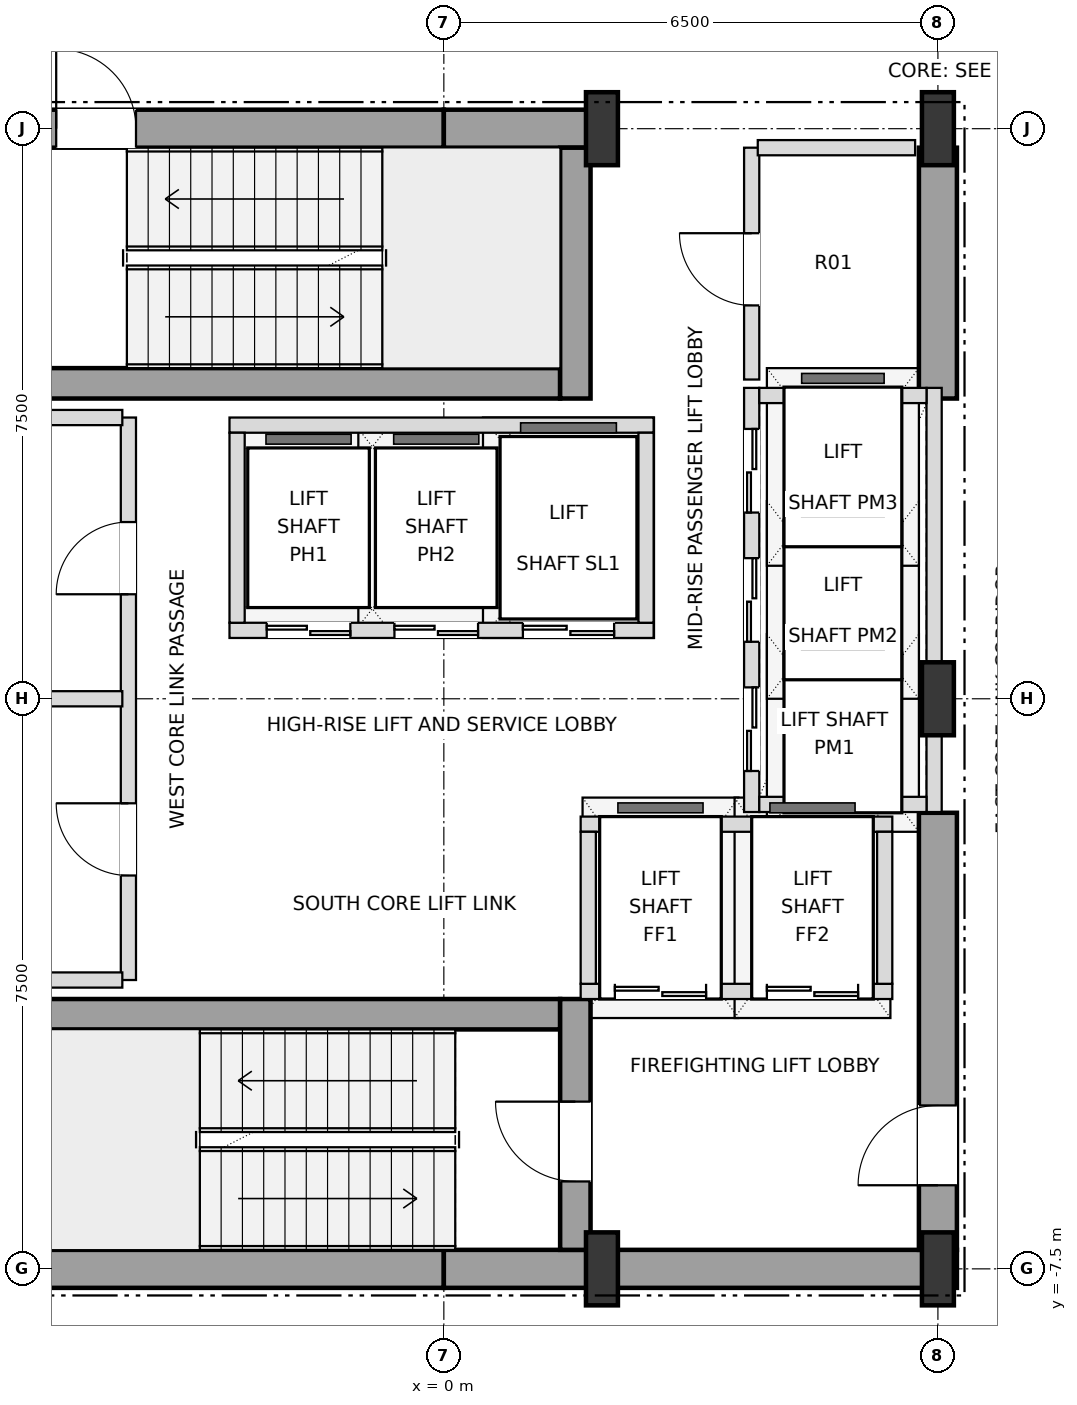
"""IFC4 building model, lengths in metres.
Left out: names, types, materials, properties, quantities, classifications, styles, units other than length and angle.
Written with IfcOpenShell. Run it as: python <this file> out.ifc"""

import sys

from ifc_helpers import new_model, si_unit, direction, frame, frame_2d, origin, origin_2d, place, context, subcontext, project, spatial, rectangle, i_section, extrude, element, fill, save


model = new_model("IFC4")
c1 = context("Model", 3, precision=1e-05, world=origin(), true_north=direction((0.0, 1.0)))
c2 = subcontext(c1, "Body", "Model", "MODEL_VIEW")
j1 = project(units=[si_unit("LENGTHUNIT", "METRE"), si_unit("PLANEANGLEUNIT", "RADIAN")], contexts=[c1])
p1 = place(None, origin())
s1 = spatial("IfcSite", under=j1, at=p1, CompositionType="ELEMENT")
p2 = place(p1, origin())
s2 = spatial("IfcBuilding", under=s1, at=p2, CompositionType="ELEMENT")
p3 = place(p2, frame((0.0, 0.0, 125.1)))
s3 = spatial("IfcBuildingStorey", under=s2, at=p3, CompositionType="ELEMENT", Elevation=125.1)
for number, where, z_axis, x_axis in (
    (1, (2.08, -7.5, 0.0), (0.0, 0.0, 1.0), (1.0, 0.0, 0.0)),
    (2, (6.5, -7.5, 0.0), (0.0, 0.0, 1.0), (1.0, 0.0, 0.0)),
    (3, (6.5, 0.0, 0.0), (0.0, 0.0, 1.0), (1.0, 0.0, 0.0)),
    (4, (2.08, 7.5, 0.0), (0.0, 0.0, 1.0), (1.0, 0.0, 0.0)),
    (5, (6.5, 7.5, 0.0), (0.0, 0.0, 1.0), (1.0, 0.0, 0.0)),
):
    element("IfcColumn", number, at=place(p3, frame(where, z_axis=z_axis, x_axis=x_axis)), inside=s3, PredefinedType="COLUMN", context=c2, shape_type="SweptSolid", body=[
        extrude(i_section(OverallWidth=0.42, OverallDepth=0.96, WebThickness=0.022, FlangeThickness=0.034, at=origin_2d()), origin(), (0.0, 0.0, 1.0), 4.5),
    ])
for number, where, z_axis, x_axis in (
    (6, (-6.75, -7.5, 0.0), (0.0, 0.0, 1.0), (1.0, 0.0, 0.0)),
    (7, (0.0, -7.5, 0.0), (0.0, 0.0, 1.0), (1.0, 0.0, 0.0)),
):
    element("IfcWall", number, at=place(p3, frame(where, z_axis=z_axis, x_axis=x_axis)), inside=s3, PredefinedType="SHEAR", context=c2, shape_type="SweptSolid", body=[
        extrude(rectangle(XDim=6.75, YDim=0.5, at=frame_2d((3.375, 0.0))), origin(), (0.0, 0.0, 1.0), 4.28),
    ])
p4 = place(p3, frame((-6.75, 7.5, 0.0), z_axis=(0.0, 0.0, 1.0), x_axis=(1.0, 0.0, 0.0)))
e8 = element("IfcWall", 8, at=p4, inside=s3, PredefinedType="SHEAR", context=c2, shape_type="SweptSolid", body=[
    extrude(rectangle(XDim=6.75, YDim=0.5, at=frame_2d((3.375, 0.0))), origin(), (0.0, 0.0, 1.0), 4.28),
])
p5 = place(p4, frame((1.65, 0.0, 0.0)))
e9 = element("IfcOpeningElement", 9, at=p5, cuts=e8, PredefinedType="OPENING", context=c2, shape_type="SweptSolid", body=[
    extrude(rectangle(XDim=1.05, YDim=2.15, at=frame_2d((0.525, 1.075))), frame((0.0, 0.26, 0.0), z_axis=(0.0, -1.0, 0.0), x_axis=(1.0, 0.0, 0.0)), (0.0, 0.0, 1.0), 0.52),
])
p6 = place(p3, frame((0.0, 7.5, 0.0), z_axis=(0.0, 0.0, 1.0), x_axis=(1.0, 0.0, 0.0)))
e10 = element("IfcWall", 10, at=p6, inside=s3, PredefinedType="SHEAR", context=c2, shape_type="SweptSolid", body=[
    extrude(rectangle(XDim=2.08, YDim=0.5, at=frame_2d((1.04, 0.0))), origin(), (0.0, 0.0, 1.0), 4.28),
])
p7 = place(p3, frame((6.5, -7.25, 0.0), z_axis=(0.0, 0.0, 1.0), x_axis=(0.0, 1.0, 0.0)))
e11 = element("IfcWall", 11, at=p7, inside=s3, PredefinedType="SHEAR", context=c2, shape_type="SweptSolid", body=[
    extrude(rectangle(XDim=5.75, YDim=0.5, at=frame_2d((2.875, 0.0))), origin(), (0.0, 0.0, 1.0), 4.28),
])
p8 = place(p7, frame((0.85, 0.0, 0.0)))
e12 = element("IfcOpeningElement", 12, at=p8, cuts=e11, PredefinedType="OPENING", context=c2, shape_type="SweptSolid", body=[
    extrude(rectangle(XDim=1.05, YDim=2.15, at=frame_2d((0.525, 1.075))), frame((0.0, 0.26, 0.0), z_axis=(0.0, -1.0, 0.0), x_axis=(1.0, 0.0, 0.0)), (0.0, 0.0, 1.0), 0.52),
])
p9 = place(p3, frame((6.5, 3.95, 0.0), z_axis=(0.0, 0.0, 1.0), x_axis=(0.0, 1.0, 0.0)))
e13 = element("IfcWall", 13, at=p9, inside=s3, PredefinedType="SHEAR", context=c2, shape_type="SweptSolid", body=[
    extrude(rectangle(XDim=3.3, YDim=0.5, at=frame_2d((1.65, 0.0))), origin(), (0.0, 0.0, 1.0), 4.28),
])
p10 = place(p3, frame((-6.25, -4.15, 0.0), z_axis=(0.0, 0.0, 1.0), x_axis=(1.0, 0.0, 0.0)))
e14 = element("IfcWall", 14, at=p10, inside=s3, PredefinedType="SHEAR", context=c2, shape_type="SweptSolid", body=[
    extrude(rectangle(XDim=7.78, YDim=0.4, at=frame_2d((3.89, 0.0))), origin(), (0.0, 0.0, 1.0), 4.28),
])
p11 = place(p3, frame((1.73, -7.25, 0.0), z_axis=(0.0, 0.0, 1.0), x_axis=(0.0, 1.0, 0.0)))
e15 = element("IfcWall", 15, at=p11, inside=s3, PredefinedType="SHEAR", context=c2, shape_type="SweptSolid", body=[
    extrude(rectangle(XDim=3.3, YDim=0.4, at=frame_2d((1.65, 0.0))), origin(), (0.0, 0.0, 1.0), 4.28),
])
p12 = place(p11, frame((0.9, 0.0, 0.0)))
e16 = element("IfcOpeningElement", 16, at=p12, cuts=e15, PredefinedType="OPENING", context=c2, shape_type="SweptSolid", body=[
    extrude(rectangle(XDim=1.05, YDim=2.15, at=frame_2d((0.525, 1.075))), frame((0.0, 0.21, 0.0), z_axis=(0.0, -1.0, 0.0), x_axis=(1.0, 0.0, 0.0)), (0.0, 0.0, 1.0), 0.42),
])
p13 = place(p3, frame((-5.55, 4.15, 0.0), z_axis=(0.0, 0.0, 1.0), x_axis=(1.0, 0.0, 0.0)))
e17 = element("IfcWall", 17, at=p13, inside=s3, PredefinedType="SHEAR", context=c2, shape_type="SweptSolid", body=[
    extrude(rectangle(XDim=7.08, YDim=0.4, at=frame_2d((3.54, 0.0))), origin(), (0.0, 0.0, 1.0), 4.28),
])
p14 = place(p3, frame((1.73, 3.95, 0.0), z_axis=(0.0, 0.0, 1.0), x_axis=(0.0, 1.0, 0.0)))
e18 = element("IfcWall", 18, at=p14, inside=s3, PredefinedType="SHEAR", context=c2, shape_type="SweptSolid", body=[
    extrude(rectangle(XDim=3.3, YDim=0.4, at=frame_2d((1.65, 0.0))), origin(), (0.0, 0.0, 1.0), 4.28),
])
p15 = place(p3, frame((4.05, -1.49, 0.0), z_axis=(0.0, 0.0, 1.0), x_axis=(0.0, 1.0, 0.0)))
e19 = element("IfcWall", 19, at=p15, inside=s3, PredefinedType="SOLIDWALL", context=c2, shape_type="SweptSolid", body=[
    extrude(rectangle(XDim=5.58, YDim=0.2, at=frame_2d((2.79, 0.0))), origin(), (0.0, 0.0, 1.0), 4.28),
])
p16 = place(p15, frame((0.54, 0.0, 0.0)))
e20 = element("IfcOpeningElement", 20, at=p16, cuts=e19, PredefinedType="OPENING", context=c2, shape_type="SweptSolid", body=[
    extrude(rectangle(XDim=1.1, YDim=2.15, at=frame_2d((0.55, 1.075))), frame((0.0, 0.11, 0.0), z_axis=(0.0, -1.0, 0.0), x_axis=(1.0, 0.0, 0.0)), (0.0, 0.0, 1.0), 0.22),
])
p17 = place(p15, frame((2.24, 0.0, 0.0)))
e21 = element("IfcOpeningElement", 21, at=p17, cuts=e19, PredefinedType="OPENING", context=c2, shape_type="SweptSolid", body=[
    extrude(rectangle(XDim=1.1, YDim=2.15, at=frame_2d((0.55, 1.075))), frame((0.0, 0.11, 0.0), z_axis=(0.0, -1.0, 0.0), x_axis=(1.0, 0.0, 0.0)), (0.0, 0.0, 1.0), 0.22),
])
p18 = place(p15, frame((3.94, 0.0, 0.0)))
e22 = element("IfcOpeningElement", 22, at=p18, cuts=e19, PredefinedType="OPENING", context=c2, shape_type="SweptSolid", body=[
    extrude(rectangle(XDim=1.1, YDim=2.15, at=frame_2d((0.55, 1.075))), frame((0.0, 0.11, 0.0), z_axis=(0.0, -1.0, 0.0), x_axis=(1.0, 0.0, 0.0)), (0.0, 0.0, 1.0), 0.22),
])
p19 = place(p3, frame((6.45, -1.49, 0.0), z_axis=(0.0, 0.0, 1.0), x_axis=(0.0, 1.0, 0.0)))
e23 = element("IfcWall", 23, at=p19, inside=s3, PredefinedType="SOLIDWALL", context=c2, shape_type="SweptSolid", body=[
    extrude(rectangle(XDim=5.58, YDim=0.2, at=frame_2d((2.79, 0.0))), origin(), (0.0, 0.0, 1.0), 3.716),
])
for number, where, z_axis, x_axis in (
    (24, (4.15, -1.39, 0.0), (0.0, 0.0, 1.0), (1.0, 0.0, 0.0)),
    (25, (4.15, 3.99, 0.0), (0.0, 0.0, 1.0), (1.0, 0.0, 0.0)),
):
    element("IfcWall", number, at=place(p3, frame(where, z_axis=z_axis, x_axis=x_axis)), inside=s3, PredefinedType="SOLIDWALL", context=c2, shape_type="SweptSolid", body=[
        extrude(rectangle(XDim=2.2, YDim=0.2, at=frame_2d((1.1, 0.0))), origin(), (0.0, 0.0, 1.0), 4.28),
    ])
p20 = place(p3, frame((-2.82, 0.9, 0.0), z_axis=(0.0, 0.0, 1.0), x_axis=(1.0, 0.0, 0.0)))
e26 = element("IfcWall", 26, at=p20, inside=s3, PredefinedType="SOLIDWALL", context=c2, shape_type="SweptSolid", body=[
    extrude(rectangle(XDim=5.58, YDim=0.2, at=frame_2d((2.79, 0.0))), origin(), (0.0, 0.0, 1.0), 4.28),
])
p21 = place(p20, frame((0.49, 0.0, 0.0)))
e27 = element("IfcOpeningElement", 27, at=p21, cuts=e26, PredefinedType="OPENING", context=c2, shape_type="SweptSolid", body=[
    extrude(rectangle(XDim=1.1, YDim=2.15, at=frame_2d((0.55, 1.075))), frame((0.0, 0.11, 0.0), z_axis=(0.0, -1.0, 0.0), x_axis=(1.0, 0.0, 0.0)), (0.0, 0.0, 1.0), 0.22),
])
p22 = place(p20, frame((2.17, 0.0, 0.0)))
e28 = element("IfcOpeningElement", 28, at=p22, cuts=e26, PredefinedType="OPENING", context=c2, shape_type="SweptSolid", body=[
    extrude(rectangle(XDim=1.1, YDim=2.15, at=frame_2d((0.55, 1.075))), frame((0.0, 0.11, 0.0), z_axis=(0.0, -1.0, 0.0), x_axis=(1.0, 0.0, 0.0)), (0.0, 0.0, 1.0), 0.22),
])
p23 = place(p20, frame((3.86, 0.0, 0.0)))
e29 = element("IfcOpeningElement", 29, at=p23, cuts=e26, PredefinedType="OPENING", context=c2, shape_type="SweptSolid", body=[
    extrude(rectangle(XDim=1.2, YDim=2.2, at=frame_2d((0.6, 1.1))), frame((0.0, 0.11, 0.0), z_axis=(0.0, -1.0, 0.0), x_axis=(1.0, 0.0, 0.0)), (0.0, 0.0, 1.0), 0.22),
])
p24 = place(p3, frame((-2.82, 3.6, 0.0), z_axis=(0.0, 0.0, 1.0), x_axis=(1.0, 0.0, 0.0)))
e30 = element("IfcWall", 30, at=p24, inside=s3, PredefinedType="SOLIDWALL", context=c2, shape_type="SweptSolid", body=[
    extrude(rectangle(XDim=5.58, YDim=0.2, at=frame_2d((2.79, 0.0))), origin(), (0.0, 0.0, 1.0), 4.28),
])
for number, where, z_axis, x_axis in (
    (31, (-2.72, 1.0, 0.0), (0.0, 0.0, 1.0), (0.0, 1.0, 0.0)),
    (32, (2.66, 1.0, 0.0), (0.0, 0.0, 1.0), (0.0, 1.0, 0.0)),
):
    element("IfcWall", number, at=place(p3, frame(where, z_axis=z_axis, x_axis=x_axis)), inside=s3, PredefinedType="SOLIDWALL", context=c2, shape_type="SweptSolid", body=[
        extrude(rectangle(XDim=2.5, YDim=0.2, at=frame_2d((1.25, 0.0))), origin(), (0.0, 0.0, 1.0), 4.28),
    ])
p25 = place(p3, frame((1.8, -3.85, 0.0), z_axis=(0.0, 0.0, 1.0), x_axis=(1.0, 0.0, 0.0)))
e33 = element("IfcWall", 33, at=p25, inside=s3, PredefinedType="SOLIDWALL", context=c2, shape_type="SweptSolid", body=[
    extrude(rectangle(XDim=4.1, YDim=0.2, at=frame_2d((2.05, 0.0))), origin(), (0.0, 0.0, 1.0), 4.28),
])
p26 = place(p25, frame((0.45, 0.0, 0.0)))
e34 = element("IfcOpeningElement", 34, at=p26, cuts=e33, PredefinedType="OPENING", context=c2, shape_type="SweptSolid", body=[
    extrude(rectangle(XDim=1.2, YDim=2.2, at=frame_2d((0.6, 1.1))), frame((0.0, 0.11, 0.0), z_axis=(0.0, -1.0, 0.0), x_axis=(1.0, 0.0, 0.0)), (0.0, 0.0, 1.0), 0.22),
])
p27 = place(p25, frame((2.45, 0.0, 0.0)))
e35 = element("IfcOpeningElement", 35, at=p27, cuts=e33, PredefinedType="OPENING", context=c2, shape_type="SweptSolid", body=[
    extrude(rectangle(XDim=1.2, YDim=2.2, at=frame_2d((0.6, 1.1))), frame((0.0, 0.11, 0.0), z_axis=(0.0, -1.0, 0.0), x_axis=(1.0, 0.0, 0.0)), (0.0, 0.0, 1.0), 0.22),
])
p28 = place(p3, frame((1.8, -1.65, 0.0), z_axis=(0.0, 0.0, 1.0), x_axis=(1.0, 0.0, 0.0)))
e36 = element("IfcWall", 36, at=p28, inside=s3, PredefinedType="SOLIDWALL", context=c2, shape_type="SweptSolid", body=[
    extrude(rectangle(XDim=4.1, YDim=0.2, at=frame_2d((2.05, 0.0))), origin(), (0.0, 0.0, 1.0), 4.28),
])
for number, where, z_axis, x_axis in (
    (37, (1.9, -3.75, 0.0), (0.0, 0.0, 1.0), (0.0, 1.0, 0.0)),
    (38, (5.8, -3.75, 0.0), (0.0, 0.0, 1.0), (0.0, 1.0, 0.0)),
):
    element("IfcWall", number, at=place(p3, frame(where, z_axis=z_axis, x_axis=x_axis)), inside=s3, PredefinedType="SOLIDWALL", context=c2, shape_type="SweptSolid", body=[
        extrude(rectangle(XDim=2.0, YDim=0.2, at=frame_2d((1.0, 0.0))), origin(), (0.0, 0.0, 1.0), 4.28),
    ])
p29 = place(p3, frame((-4.15, -3.7, 0.0), z_axis=(0.0, 0.0, 1.0), x_axis=(0.0, 1.0, 0.0)))
e39 = element("IfcWall", 39, at=p29, inside=s3, PredefinedType="SOLIDWALL", context=c2, shape_type="SweptSolid", body=[
    extrude(rectangle(XDim=7.4, YDim=0.2, at=frame_2d((3.7, 0.0))), origin(), (0.0, 0.0, 1.0), 4.28),
])
p30 = place(p29, frame((1.375, 0.0, 0.0)))
e40 = element("IfcOpeningElement", 40, at=p30, cuts=e39, PredefinedType="OPENING", context=c2, shape_type="SweptSolid", body=[
    extrude(rectangle(XDim=0.95, YDim=2.15, at=frame_2d((0.475, 1.075))), frame((0.0, 0.11, 0.0), z_axis=(0.0, -1.0, 0.0), x_axis=(1.0, 0.0, 0.0)), (0.0, 0.0, 1.0), 0.22),
])
p31 = place(p29, frame((5.075, 0.0, 0.0)))
e41 = element("IfcOpeningElement", 41, at=p31, cuts=e39, PredefinedType="OPENING", context=c2, shape_type="SweptSolid", body=[
    extrude(rectangle(XDim=0.95, YDim=2.15, at=frame_2d((0.475, 1.075))), frame((0.0, 0.11, 0.0), z_axis=(0.0, -1.0, 0.0), x_axis=(1.0, 0.0, 0.0)), (0.0, 0.0, 1.0), 0.22),
])
p32 = place(p3, frame((4.05, 4.2, 0.0), z_axis=(0.0, 0.0, 1.0), x_axis=(0.0, 1.0, 0.0)))
e42 = element("IfcWall", 42, at=p32, inside=s3, PredefinedType="SOLIDWALL", context=c2, shape_type="SweptSolid", body=[
    extrude(rectangle(XDim=3.05, YDim=0.2, at=frame_2d((1.525, 0.0))), origin(), (0.0, 0.0, 1.0), 4.28),
])
p33 = place(p32, frame((0.975, 0.0, 0.0)))
e43 = element("IfcOpeningElement", 43, at=p33, cuts=e42, PredefinedType="OPENING", context=c2, shape_type="SweptSolid", body=[
    extrude(rectangle(XDim=0.95, YDim=2.15, at=frame_2d((0.475, 1.075))), frame((0.0, 0.11, 0.0), z_axis=(0.0, -1.0, 0.0), x_axis=(1.0, 0.0, 0.0)), (0.0, 0.0, 1.0), 0.22),
])
for number, where, z_axis, x_axis in (
    (44, (-6.17, -3.7, 0.0), (0.0, 0.0, 1.0), (1.0, 0.0, 0.0)),
    (45, (-6.17, 0.0, 0.0), (0.0, 0.0, 1.0), (1.0, 0.0, 0.0)),
    (46, (-6.17, 3.7, 0.0), (0.0, 0.0, 1.0), (1.0, 0.0, 0.0)),
):
    element("IfcWall", number, at=place(p3, frame(where, z_axis=z_axis, x_axis=x_axis)), inside=s3, PredefinedType="SOLIDWALL", context=c2, shape_type="SweptSolid", body=[
        extrude(rectangle(XDim=1.94, YDim=0.2, at=frame_2d((0.97, 0.0))), origin(), (0.0, 0.0, 1.0), 4.28),
    ])
p34 = place(p3, frame((4.13, 7.25, 0.0), z_axis=(0.0, 0.0, 1.0), x_axis=(1.0, 0.0, 0.0)))
e47 = element("IfcWall", 47, at=p34, inside=s3, PredefinedType="SOLIDWALL", context=c2, shape_type="SweptSolid", body=[
    extrude(rectangle(XDim=2.07, YDim=0.2, at=frame_2d((1.035, 0.0))), origin(), (0.0, 0.0, 1.0), 4.28),
])
p35 = place(p8, origin())
e48 = element("IfcDoor", 48, at=p35, inside=s3, OperationType="SINGLE_SWING_LEFT", PredefinedType="DOOR", context=c2, shape_type="SweptSolid", body=[
    extrude(rectangle(XDim=1.05, YDim=2.15, at=frame_2d((0.525, 1.075))), frame((0.0, 0.025, 0.0), z_axis=(0.0, -1.0, 0.0), x_axis=(1.0, 0.0, 0.0)), (0.0, 0.0, 1.0), 0.05),
])
fill(e12, e48)
p36 = place(p12, origin())
e49 = element("IfcDoor", 49, at=p36, inside=s3, OperationType="SINGLE_SWING_RIGHT", PredefinedType="DOOR", context=c2, shape_type="SweptSolid", body=[
    extrude(rectangle(XDim=1.05, YDim=2.15, at=frame_2d((0.525, 1.075))), frame((0.0, 0.025, 0.0), z_axis=(0.0, -1.0, 0.0), x_axis=(1.0, 0.0, 0.0)), (0.0, 0.0, 1.0), 0.05),
])
fill(e16, e49)
p37 = place(p5, origin())
e50 = element("IfcDoor", 50, at=p37, inside=s3, OperationType="SINGLE_SWING_LEFT", PredefinedType="DOOR", context=c2, shape_type="SweptSolid", body=[
    extrude(rectangle(XDim=1.05, YDim=2.15, at=frame_2d((0.525, 1.075))), frame((0.0, 0.025, 0.0), z_axis=(0.0, -1.0, 0.0), x_axis=(1.0, 0.0, 0.0)), (0.0, 0.0, 1.0), 0.05),
])
fill(e9, e50)
p38 = place(p16, origin())
e51 = element("IfcDoor", 51, at=p38, inside=s3, OperationType="DOUBLE_DOOR_SLIDING", PredefinedType="DOOR", context=c2, shape_type="SweptSolid", body=[
    extrude(rectangle(XDim=1.1, YDim=2.15, at=frame_2d((0.55, 1.075))), frame((0.0, 0.025, 0.0), z_axis=(0.0, -1.0, 0.0), x_axis=(1.0, 0.0, 0.0)), (0.0, 0.0, 1.0), 0.05),
])
fill(e20, e51)
p39 = place(p17, origin())
e52 = element("IfcDoor", 52, at=p39, inside=s3, OperationType="DOUBLE_DOOR_SLIDING", PredefinedType="DOOR", context=c2, shape_type="SweptSolid", body=[
    extrude(rectangle(XDim=1.1, YDim=2.15, at=frame_2d((0.55, 1.075))), frame((0.0, 0.025, 0.0), z_axis=(0.0, -1.0, 0.0), x_axis=(1.0, 0.0, 0.0)), (0.0, 0.0, 1.0), 0.05),
])
fill(e21, e52)
p40 = place(p18, origin())
e53 = element("IfcDoor", 53, at=p40, inside=s3, OperationType="DOUBLE_DOOR_SLIDING", PredefinedType="DOOR", context=c2, shape_type="SweptSolid", body=[
    extrude(rectangle(XDim=1.1, YDim=2.15, at=frame_2d((0.55, 1.075))), frame((0.0, 0.025, 0.0), z_axis=(0.0, -1.0, 0.0), x_axis=(1.0, 0.0, 0.0)), (0.0, 0.0, 1.0), 0.05),
])
fill(e22, e53)
p41 = place(p21, origin())
e54 = element("IfcDoor", 54, at=p41, inside=s3, OperationType="DOUBLE_DOOR_SLIDING", PredefinedType="DOOR", context=c2, shape_type="SweptSolid", body=[
    extrude(rectangle(XDim=1.1, YDim=2.15, at=frame_2d((0.55, 1.075))), frame((0.0, 0.025, 0.0), z_axis=(0.0, -1.0, 0.0), x_axis=(1.0, 0.0, 0.0)), (0.0, 0.0, 1.0), 0.05),
])
fill(e27, e54)
p42 = place(p22, origin())
e55 = element("IfcDoor", 55, at=p42, inside=s3, OperationType="DOUBLE_DOOR_SLIDING", PredefinedType="DOOR", context=c2, shape_type="SweptSolid", body=[
    extrude(rectangle(XDim=1.1, YDim=2.15, at=frame_2d((0.55, 1.075))), frame((0.0, 0.025, 0.0), z_axis=(0.0, -1.0, 0.0), x_axis=(1.0, 0.0, 0.0)), (0.0, 0.0, 1.0), 0.05),
])
fill(e28, e55)
p43 = place(p23, origin())
e56 = element("IfcDoor", 56, at=p43, inside=s3, OperationType="DOUBLE_DOOR_SLIDING", PredefinedType="DOOR", context=c2, shape_type="SweptSolid", body=[
    extrude(rectangle(XDim=1.2, YDim=2.2, at=frame_2d((0.6, 1.1))), frame((0.0, 0.025, 0.0), z_axis=(0.0, -1.0, 0.0), x_axis=(1.0, 0.0, 0.0)), (0.0, 0.0, 1.0), 0.05),
])
fill(e29, e56)
p44 = place(p26, origin())
e57 = element("IfcDoor", 57, at=p44, inside=s3, OperationType="DOUBLE_DOOR_SLIDING", PredefinedType="DOOR", context=c2, shape_type="SweptSolid", body=[
    extrude(rectangle(XDim=1.2, YDim=2.2, at=frame_2d((0.6, 1.1))), frame((0.0, 0.025, 0.0), z_axis=(0.0, -1.0, 0.0), x_axis=(1.0, 0.0, 0.0)), (0.0, 0.0, 1.0), 0.05),
])
fill(e34, e57)
p45 = place(p27, origin())
e58 = element("IfcDoor", 58, at=p45, inside=s3, OperationType="DOUBLE_DOOR_SLIDING", PredefinedType="DOOR", context=c2, shape_type="SweptSolid", body=[
    extrude(rectangle(XDim=1.2, YDim=2.2, at=frame_2d((0.6, 1.1))), frame((0.0, 0.025, 0.0), z_axis=(0.0, -1.0, 0.0), x_axis=(1.0, 0.0, 0.0)), (0.0, 0.0, 1.0), 0.05),
])
fill(e35, e58)
p46 = place(p30, origin())
e59 = element("IfcDoor", 59, at=p46, inside=s3, OperationType="SINGLE_SWING_RIGHT", PredefinedType="DOOR", context=c2, shape_type="SweptSolid", body=[
    extrude(rectangle(XDim=0.95, YDim=2.15, at=frame_2d((0.475, 1.075))), frame((0.0, 0.025, 0.0), z_axis=(0.0, -1.0, 0.0), x_axis=(1.0, 0.0, 0.0)), (0.0, 0.0, 1.0), 0.05),
])
fill(e40, e59)
p47 = place(p31, origin())
e60 = element("IfcDoor", 60, at=p47, inside=s3, OperationType="SINGLE_SWING_LEFT", PredefinedType="DOOR", context=c2, shape_type="SweptSolid", body=[
    extrude(rectangle(XDim=0.95, YDim=2.15, at=frame_2d((0.475, 1.075))), frame((0.0, 0.025, 0.0), z_axis=(0.0, -1.0, 0.0), x_axis=(1.0, 0.0, 0.0)), (0.0, 0.0, 1.0), 0.05),
])
fill(e41, e60)
p48 = place(p33, origin())
e61 = element("IfcDoor", 61, at=p48, inside=s3, OperationType="SINGLE_SWING_RIGHT", PredefinedType="DOOR", context=c2, shape_type="SweptSolid", body=[
    extrude(rectangle(XDim=0.95, YDim=2.15, at=frame_2d((0.475, 1.075))), frame((0.0, 0.025, 0.0), z_axis=(0.0, -1.0, 0.0), x_axis=(1.0, 0.0, 0.0)), (0.0, 0.0, 1.0), 0.05),
])
fill(e43, e61)
save(model, sys.argv[1])
